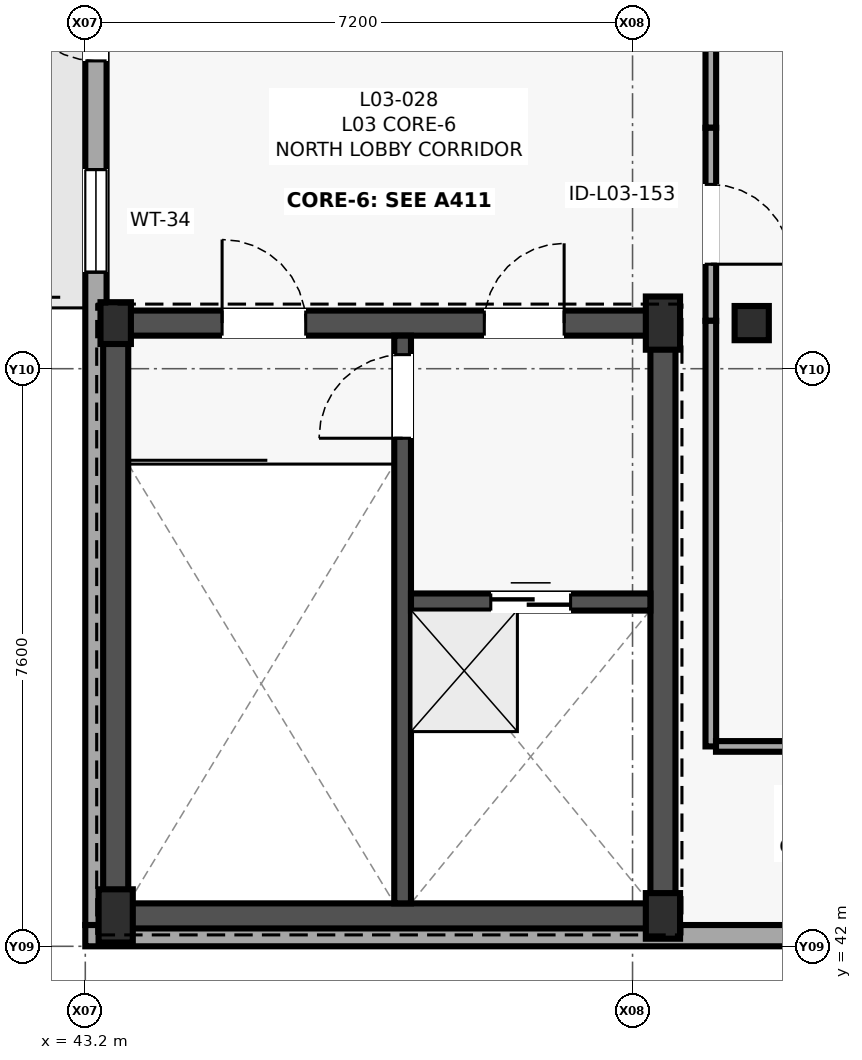
"""IFC4 building model, lengths in metres.
Left out: names, types, materials, properties, quantities, classifications, styles, units other than length and angle.
Written with IfcOpenShell. Run it as: python <this file> out.ifc"""

import sys

from ifc_helpers import new_model, si_unit, direction, frame, frame_2d, origin, origin_2d, place, context, subcontext, project, spatial, rectangle, circle, extrude, element, fill, save


model = new_model("IFC4")
c1 = context("Model", 3, precision=1e-05, world=origin(), true_north=direction((0.0, 1.0)))
c2 = subcontext(c1, "Body", "Model", "MODEL_VIEW")
j1 = project(units=[si_unit("LENGTHUNIT", "METRE"), si_unit("PLANEANGLEUNIT", "RADIAN")], contexts=[c1])
p1 = place(None, origin())
s1 = spatial("IfcSite", under=j1, at=p1, CompositionType="ELEMENT")
p2 = place(p1, origin())
s2 = spatial("IfcBuilding", under=s1, at=p2, CompositionType="ELEMENT")
p3 = place(p2, frame((0.0, 0.0, 12.2)))
s3 = spatial("IfcBuildingStorey", under=s2, at=p3, CompositionType="ELEMENT", Elevation=12.2)
p4 = place(p3, frame((43.6, 42.4, 0.0), z_axis=(0.0, 0.0, 1.0), x_axis=(1.0, 0.0, 0.0)))
e1 = element("IfcColumn", 1, at=p4, inside=s3, PredefinedType="COLUMN", context=c2, shape_type="SweptSolid", body=[
    extrude(rectangle(XDim=0.45, YDim=0.7, at=origin_2d()), origin(), (0.0, 0.0, 1.0), 4.0),
])
p5 = place(p3, frame((43.6, 50.2, 0.0), z_axis=(0.0, 0.0, 1.0), x_axis=(1.0, 0.0, 0.0)))
e2 = element("IfcColumn", 2, at=p5, inside=s3, PredefinedType="COLUMN", context=c2, shape_type="SweptSolid", body=[
    extrude(rectangle(XDim=0.4, YDim=0.55, at=origin_2d()), origin(), (0.0, 0.0, 1.0), 4.0),
])
p6 = place(p3, frame((50.8, 42.4, 0.0), z_axis=(0.0, 0.0, 1.0), x_axis=(1.0, 0.0, 0.0)))
e3 = element("IfcColumn", 3, at=p6, inside=s3, PredefinedType="COLUMN", context=c2, shape_type="SweptSolid", body=[
    extrude(rectangle(XDim=0.45, YDim=0.6, at=origin_2d()), origin(), (0.0, 0.0, 1.0), 4.0),
])
p7 = place(p3, frame((50.8, 50.2, 0.0), z_axis=(0.0, 0.0, 1.0), x_axis=(1.0, 0.0, 0.0)))
e4 = element("IfcColumn", 4, at=p7, inside=s3, PredefinedType="COLUMN", context=c2, shape_type="SweptSolid", body=[
    extrude(rectangle(XDim=0.45, YDim=0.7, at=origin_2d()), origin(), (0.0, 0.0, 1.0), 4.0),
])
p8 = place(p3, frame((51.968, 50.2, 0.0), z_axis=(0.0, 0.0, 1.0), x_axis=(1.0, 0.0, 0.0)))
e5 = element("IfcColumn", 5, at=p8, inside=s3, PredefinedType="COLUMN", context=c2, shape_type="SweptSolid", body=[
    extrude(circle(Radius=0.225, at=origin_2d()), origin(), (0.0, 0.0, 1.0), 4.0),
])
p9 = place(p3, frame((43.34, 59.909, 0.0), z_axis=(0.0, 0.0, 1.0), x_axis=(0.0, -1.0, 0.0)))
e6 = element("IfcWall", 6, at=p9, inside=s3, PredefinedType="SOLIDWALL", context=c2, shape_type="SweptSolid", body=[
    extrude(rectangle(XDim=17.629, YDim=0.28, at=frame_2d((8.814, 0.0))), origin(), (0.0, 0.0, 1.0), 3.205),
])
p10 = place(p9, frame((5.159, 0.0, 0.0)))
e7 = element("IfcOpeningElement", 7, at=p10, cuts=e6, PredefinedType="OPENING", context=c2, shape_type="SweptSolid", body=[
    extrude(rectangle(XDim=1.1, YDim=2.15, at=frame_2d((0.55, 1.075))), frame((0.0, 0.15, 0.0), z_axis=(0.0, -1.0, 0.0), x_axis=(1.0, 0.0, 0.0)), (0.0, 0.0, 1.0), 0.3),
])
p11 = place(p9, frame((1.163, 0.0, 1.05)))
e8 = element("IfcOpeningElement", 8, at=p11, cuts=e6, PredefinedType="OPENING", context=c2, shape_type="SweptSolid", body=[
    extrude(rectangle(XDim=1.2, YDim=0.9, at=frame_2d((0.6, 0.45))), frame((0.0, 0.15, 0.0), z_axis=(0.0, -1.0, 0.0), x_axis=(1.0, 0.0, 0.0)), (0.0, 0.0, 1.0), 0.3),
])
p12 = place(p9, frame((7.689, 0.0, 1.05)))
e9 = element("IfcOpeningElement", 9, at=p12, cuts=e6, PredefinedType="OPENING", context=c2, shape_type="SweptSolid", body=[
    extrude(rectangle(XDim=1.35, YDim=1.2, at=frame_2d((0.675, 0.6))), frame((0.0, 0.15, 0.0), z_axis=(0.0, -1.0, 0.0), x_axis=(1.0, 0.0, 0.0)), (0.0, 0.0, 1.0), 0.3),
])
p13 = place(p3, frame((43.2, 42.14, 0.0), z_axis=(0.0, 0.0, 1.0), x_axis=(1.0, 0.0, 0.0)))
e10 = element("IfcWall", 10, at=p13, inside=s3, PredefinedType="SOLIDWALL", context=c2, shape_type="SweptSolid", body=[
    extrude(rectangle(XDim=12.093, YDim=0.28, at=frame_2d((6.046, 0.0))), origin(), (0.0, 0.0, 1.0), 3.78),
])
p14 = place(p13, frame((9.377, 0.0, 0.75)))
e11 = element("IfcOpeningElement", 11, at=p14, cuts=e10, PredefinedType="OPENING", context=c2, shape_type="SweptSolid", body=[
    extrude(rectangle(XDim=1.4, YDim=2.4, at=frame_2d((0.7, 1.2))), frame((0.0, 0.15, 0.0), z_axis=(0.0, -1.0, 0.0), x_axis=(1.0, 0.0, 0.0)), (0.0, 0.0, 1.0), 0.3),
])
p15 = place(p3, frame((43.435, 42.4, 0.0), z_axis=(0.0, 0.0, 1.0), x_axis=(1.0, 0.0, 0.0)))
e12 = element("IfcWall", 12, at=p15, inside=s3, PredefinedType="SHEAR", context=c2, shape_type="SweptSolid", body=[
    extrude(rectangle(XDim=7.53, YDim=0.33, at=frame_2d((3.765, 0.0))), origin(), (0.0, 0.0, 1.0), 4.0),
])
p16 = place(p3, frame((43.435, 50.2, 0.0), z_axis=(0.0, 0.0, 1.0), x_axis=(1.0, 0.0, 0.0)))
e13 = element("IfcWall", 13, at=p16, inside=s3, PredefinedType="SHEAR", context=c2, shape_type="SweptSolid", body=[
    extrude(rectangle(XDim=7.53, YDim=0.33, at=frame_2d((3.765, 0.0))), origin(), (0.0, 0.0, 1.0), 4.0),
])
p17 = place(p16, frame((5.015, 0.0, 0.0)))
e14 = element("IfcOpeningElement", 14, at=p17, cuts=e13, PredefinedType="OPENING", context=c2, shape_type="SweptSolid", body=[
    extrude(rectangle(XDim=1.05, YDim=2.15, at=frame_2d((0.525, 1.075))), frame((0.0, 0.175, 0.0), z_axis=(0.0, -1.0, 0.0), x_axis=(1.0, 0.0, 0.0)), (0.0, 0.0, 1.0), 0.35),
])
p18 = place(p16, frame((1.565, 0.0, 0.0)))
e15 = element("IfcOpeningElement", 15, at=p18, cuts=e13, PredefinedType="OPENING", context=c2, shape_type="SweptSolid", body=[
    extrude(rectangle(XDim=1.1, YDim=2.15, at=frame_2d((0.55, 1.075))), frame((0.0, 0.175, 0.0), z_axis=(0.0, -1.0, 0.0), x_axis=(1.0, 0.0, 0.0)), (0.0, 0.0, 1.0), 0.35),
])
for number, where, z_axis, x_axis in (
    (16, (43.6, 42.565, 0.0), (0.0, 0.0, 1.0), (0.0, 1.0, 0.0)),
    (17, (50.8, 42.565, 0.0), (0.0, 0.0, 1.0), (0.0, 1.0, 0.0)),
):
    element("IfcWall", number, at=place(p3, frame(where, z_axis=z_axis, x_axis=x_axis)), inside=s3, PredefinedType="SHEAR", context=c2, shape_type="SweptSolid", body=[
        extrude(rectangle(XDim=7.47, YDim=0.33, at=frame_2d((3.735, 0.0))), origin(), (0.0, 0.0, 1.0), 4.0),
    ])
p19 = place(p3, frame((47.375, 42.565, 0.0), z_axis=(0.0, 0.0, 1.0), x_axis=(0.0, 1.0, 0.0)))
e18 = element("IfcWall", 18, at=p19, inside=s3, PredefinedType="SHEAR", context=c2, shape_type="SweptSolid", body=[
    extrude(rectangle(XDim=7.47, YDim=0.22, at=frame_2d((3.735, 0.0))), origin(), (0.0, 0.0, 1.0), 4.0),
])
p20 = place(p19, frame((6.12, 0.0, 0.0)))
e19 = element("IfcOpeningElement", 19, at=p20, cuts=e18, PredefinedType="OPENING", context=c2, shape_type="SweptSolid", body=[
    extrude(rectangle(XDim=1.1, YDim=2.15, at=frame_2d((0.55, 1.075))), frame((0.0, 0.12, 0.0), z_axis=(0.0, -1.0, 0.0), x_axis=(1.0, 0.0, 0.0)), (0.0, 0.0, 1.0), 0.24),
])
p21 = place(p3, frame((47.485, 46.53, 0.0), z_axis=(0.0, 0.0, 1.0), x_axis=(1.0, 0.0, 0.0)))
e20 = element("IfcWall", 20, at=p21, inside=s3, PredefinedType="SHEAR", context=c2, shape_type="SweptSolid", body=[
    extrude(rectangle(XDim=3.15, YDim=0.225, at=frame_2d((1.575, 0.0))), origin(), (0.0, 0.0, 1.0), 4.0),
])
p22 = place(p21, frame((1.05, 0.0, 0.0)))
e21 = element("IfcOpeningElement", 21, at=p22, cuts=e20, PredefinedType="OPENING", context=c2, shape_type="SweptSolid", body=[
    extrude(rectangle(XDim=1.05, YDim=2.2, at=frame_2d((0.525, 1.1))), frame((0.0, 0.123, 0.0), z_axis=(0.0, -1.0, 0.0), x_axis=(1.0, 0.0, 0.0)), (0.0, 0.0, 1.0), 0.245),
])
p23 = place(p3, frame((51.43, 56.77, 0.0), z_axis=(0.0, 0.0, 1.0), x_axis=(0.0, -1.0, 0.0)))
e22 = element("IfcWall", 22, at=p23, inside=s3, PredefinedType="PARTITIONING", context=c2, shape_type="SweptSolid", body=[
    extrude(rectangle(XDim=4.0, YDim=0.14, at=frame_2d((2.0, 0.0))), origin(), (0.0, 0.0, 1.0), 3.755),
])
p24 = place(p3, frame((51.43, 52.77, 0.0), z_axis=(0.0, 0.0, 1.0), x_axis=(0.0, -1.0, 0.0)))
e23 = element("IfcWall", 23, at=p24, inside=s3, PredefinedType="PARTITIONING", context=c2, shape_type="SweptSolid", body=[
    extrude(rectangle(XDim=2.54, YDim=0.14, at=frame_2d((1.27, 0.0))), origin(), (0.0, 0.0, 1.0), 3.755),
])
p25 = place(p24, frame((0.745, 0.0, 0.0)))
e24 = element("IfcOpeningElement", 24, at=p25, cuts=e23, PredefinedType="OPENING", context=c2, shape_type="SweptSolid", body=[
    extrude(rectangle(XDim=1.05, YDim=2.1, at=frame_2d((0.525, 1.05))), frame((0.0, 0.08, 0.0), z_axis=(0.0, -1.0, 0.0), x_axis=(1.0, 0.0, 0.0)), (0.0, 0.0, 1.0), 0.16),
])
p26 = place(p3, frame((51.43, 50.23, 0.0), z_axis=(0.0, 0.0, 1.0), x_axis=(0.0, -1.0, 0.0)))
e25 = element("IfcWall", 25, at=p26, inside=s3, PredefinedType="PARTITIONING", context=c2, shape_type="SweptSolid", body=[
    extrude(rectangle(XDim=5.6, YDim=0.14, at=frame_2d((2.8, 0.0))), origin(), (0.0, 0.0, 1.0), 3.755),
])
p27 = place(p3, frame((51.498, 44.63, 0.0), z_axis=(0.0, 0.0, 1.0), x_axis=(1.0, 0.0, 0.0)))
e26 = element("IfcWall", 26, at=p27, inside=s3, PredefinedType="PARTITIONING", context=c2, shape_type="SweptSolid", body=[
    extrude(rectangle(XDim=11.872, YDim=0.14, at=frame_2d((5.936, 0.0))), origin(), (0.0, 0.0, 1.0), 3.755),
])
p28 = place(p10, frame((1.1, 0.0, 0.0), z_axis=(0.0, 0.0, 1.0), x_axis=(-1.0, 0.0, 0.0)))
e27 = element("IfcDoor", 27, at=p28, inside=s3, OperationType="SINGLE_SWING_LEFT", PredefinedType="DOOR", context=c2, shape_type="SweptSolid", body=[
    extrude(rectangle(XDim=1.1, YDim=2.15, at=frame_2d((0.55, 1.075))), frame((0.0, 0.025, 0.0), z_axis=(0.0, -1.0, 0.0), x_axis=(1.0, 0.0, 0.0)), (0.0, 0.0, 1.0), 0.05),
])
fill(e7, e27)
p29 = place(p12, origin())
e28 = element("IfcWindow", 28, at=p29, inside=s3, PartitioningType="SINGLE_PANEL", PredefinedType="WINDOW", context=c2, shape_type="SweptSolid", body=[
    extrude(rectangle(XDim=1.35, YDim=1.2, at=frame_2d((0.675, 0.6))), frame((0.0, 0.03, 0.0), z_axis=(0.0, -1.0, 0.0), x_axis=(1.0, 0.0, 0.0)), (0.0, 0.0, 1.0), 0.06),
])
fill(e9, e28)
p30 = place(p22, origin())
e29 = element("IfcDoor", 29, at=p30, inside=s3, OperationType="SLIDING_TO_LEFT", PredefinedType="DOOR", context=c2, shape_type="SweptSolid", body=[
    extrude(rectangle(XDim=1.05, YDim=2.2, at=frame_2d((0.525, 1.1))), frame((0.0, 0.025, 0.0), z_axis=(0.0, -1.0, 0.0), x_axis=(1.0, 0.0, 0.0)), (0.0, 0.0, 1.0), 0.05),
])
fill(e21, e29)
p31 = place(p20, origin())
e30 = element("IfcDoor", 30, at=p31, inside=s3, OperationType="SINGLE_SWING_LEFT", PredefinedType="DOOR", context=c2, shape_type="SweptSolid", body=[
    extrude(rectangle(XDim=1.1, YDim=2.15, at=frame_2d((0.55, 1.075))), frame((0.0, 0.025, 0.0), z_axis=(0.0, -1.0, 0.0), x_axis=(1.0, 0.0, 0.0)), (0.0, 0.0, 1.0), 0.05),
])
fill(e19, e30)
p32 = place(p17, origin())
e31 = element("IfcDoor", 31, at=p32, inside=s3, OperationType="SINGLE_SWING_RIGHT", PredefinedType="DOOR", context=c2, shape_type="SweptSolid", body=[
    extrude(rectangle(XDim=1.05, YDim=2.15, at=frame_2d((0.525, 1.075))), frame((0.0, 0.025, 0.0), z_axis=(0.0, -1.0, 0.0), x_axis=(1.0, 0.0, 0.0)), (0.0, 0.0, 1.0), 0.05),
])
fill(e14, e31)
p33 = place(p18, origin())
e32 = element("IfcDoor", 32, at=p33, inside=s3, OperationType="SINGLE_SWING_LEFT", PredefinedType="DOOR", context=c2, shape_type="SweptSolid", body=[
    extrude(rectangle(XDim=1.1, YDim=2.15, at=frame_2d((0.55, 1.075))), frame((0.0, 0.025, 0.0), z_axis=(0.0, -1.0, 0.0), x_axis=(1.0, 0.0, 0.0)), (0.0, 0.0, 1.0), 0.05),
])
fill(e15, e32)
p34 = place(p25, origin())
e33 = element("IfcDoor", 33, at=p34, inside=s3, OperationType="SINGLE_SWING_RIGHT", PredefinedType="DOOR", context=c2, shape_type="SweptSolid", body=[
    extrude(rectangle(XDim=1.05, YDim=2.1, at=frame_2d((0.525, 1.05))), frame((0.0, 0.025, 0.0), z_axis=(0.0, -1.0, 0.0), x_axis=(1.0, 0.0, 0.0)), (0.0, 0.0, 1.0), 0.05),
])
fill(e24, e33)
save(model, sys.argv[1])
